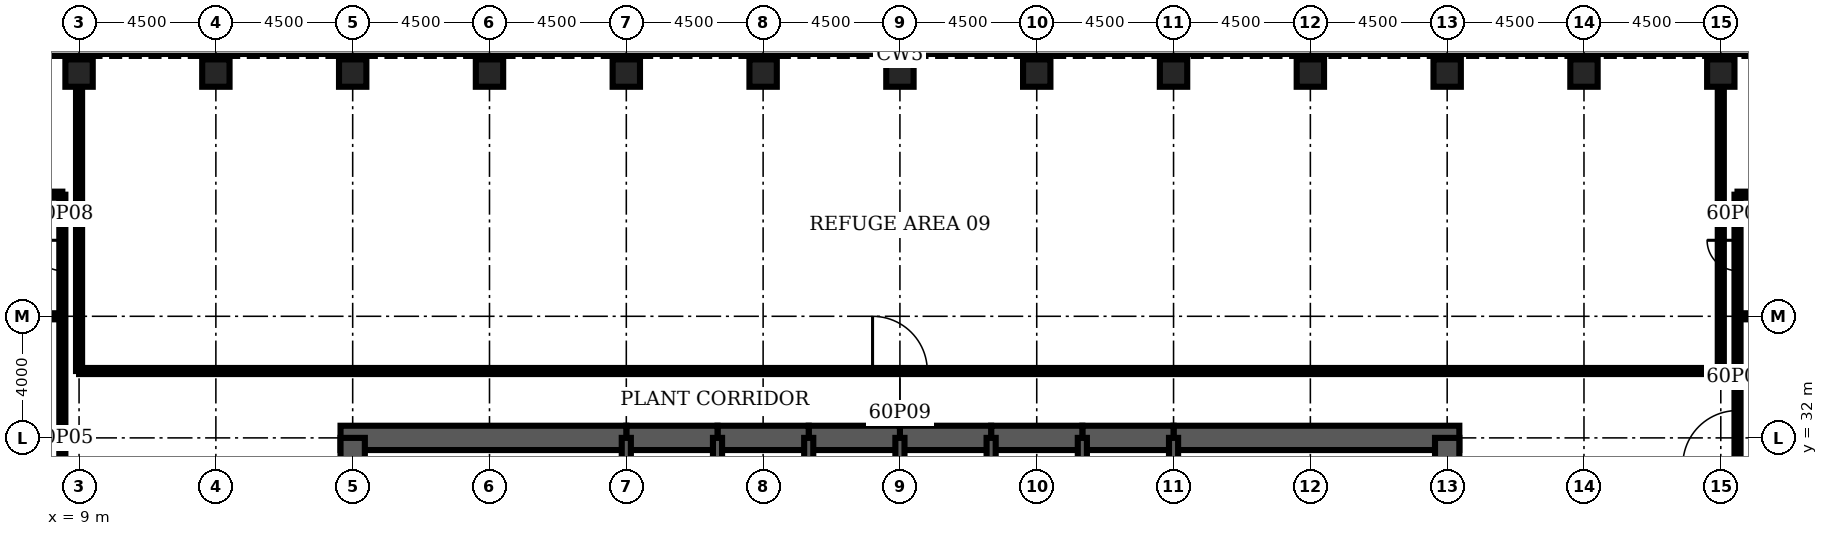
"""IFC4 building model, lengths in metres.
Left out: names, types, materials, properties, quantities, classifications, styles, units other than length and angle.
Written with IfcOpenShell. Run it as: python <this file> out.ifc"""

import sys

from ifc_helpers import new_model, si_unit, direction, frame, frame_2d, origin, origin_2d, place, context, subcontext, project, spatial, rectangle, hollow_rectangle, extrude, element, fill, save


model = new_model("IFC4")
c1 = context("Model", 3, precision=1e-05, world=origin(), true_north=direction((0.0, 1.0)))
c2 = subcontext(c1, "Body", "Model", "MODEL_VIEW")
j1 = project(units=[si_unit("LENGTHUNIT", "METRE"), si_unit("PLANEANGLEUNIT", "RADIAN")], contexts=[c1])
p1 = place(None, origin())
s1 = spatial("IfcSite", under=j1, at=p1, CompositionType="ELEMENT")
p2 = place(p1, origin())
s2 = spatial("IfcBuilding", under=s1, at=p2, CompositionType="ELEMENT")
p3 = place(p2, frame((0.0, 0.0, 265.6)))
s3 = spatial("IfcBuildingStorey", under=s2, at=p3, CompositionType="ELEMENT", Elevation=265.6)
for number, where, z_axis, x_axis in (
    (1, (63.0, 44.0, 0.0), (0.0, 0.0, 1.0), (0.0, 1.0, 0.0)),
    (2, (58.5, 44.0, 0.0), (0.0, 0.0, 1.0), (0.0, 1.0, 0.0)),
    (3, (54.0, 44.0, 0.0), (0.0, 0.0, 1.0), (0.0, 1.0, 0.0)),
    (4, (49.5, 44.0, 0.0), (0.0, 0.0, 1.0), (0.0, 1.0, 0.0)),
    (5, (45.0, 44.0, 0.0), (0.0, 0.0, 1.0), (0.0, 1.0, 0.0)),
    (6, (40.5, 44.0, 0.0), (0.0, 0.0, 1.0), (0.0, 1.0, 0.0)),
    (7, (36.0, 44.0, 0.0), (0.0, 0.0, 1.0), (0.0, 1.0, 0.0)),
    (8, (31.5, 44.0, 0.0), (0.0, 0.0, 1.0), (0.0, 1.0, 0.0)),
    (9, (27.0, 44.0, 0.0), (0.0, 0.0, 1.0), (0.0, 1.0, 0.0)),
    (10, (22.5, 44.0, 0.0), (0.0, 0.0, 1.0), (0.0, 1.0, 0.0)),
    (11, (18.0, 44.0, 0.0), (0.0, 0.0, 1.0), (0.0, 1.0, 0.0)),
    (12, (13.5, 44.0, 0.0), (0.0, 0.0, 1.0), (0.0, 1.0, 0.0)),
    (13, (9.0, 44.0, 0.0), (0.0, 0.0, 1.0), (0.0, 1.0, 0.0)),
):
    element("IfcColumn", number, at=place(p3, frame(where, z_axis=z_axis, x_axis=x_axis)), inside=s3, PredefinedType="COLUMN", context=c2, shape_type="SweptSolid", body=[
        extrude(hollow_rectangle(XDim=0.9, YDim=0.9, WallThickness=0.07, at=origin_2d()), origin(), (0.0, 0.0, 1.0), 5.5),
    ])
p4 = place(p3, frame((54.4, 32.0, 0.0), z_axis=(0.0, 0.0, 1.0), x_axis=(-1.0, 0.0, 0.0)))
e14 = element("IfcWall", 14, at=p4, inside=s3, PredefinedType="SHEAR", context=c2, shape_type="SweptSolid", body=[
    extrude(rectangle(XDim=9.4, YDim=0.8, at=frame_2d((4.7, 0.0))), origin(), (0.0, 0.0, 1.0), 5.5),
])
for number, where, z_axis, x_axis in (
    (15, (45.0, 32.0, 0.0), (0.0, 0.0, 1.0), (-1.0, 0.0, 0.0)),
    (16, (42.0, 32.0, 0.0), (0.0, 0.0, 1.0), (-1.0, 0.0, 0.0)),
    (17, (39.0, 32.0, 0.0), (0.0, 0.0, 1.0), (-1.0, 0.0, 0.0)),
    (18, (36.0, 32.0, 0.0), (0.0, 0.0, 1.0), (-1.0, 0.0, 0.0)),
    (19, (33.0, 32.0, 0.0), (0.0, 0.0, 1.0), (-1.0, 0.0, 0.0)),
    (20, (30.0, 32.0, 0.0), (0.0, 0.0, 1.0), (-1.0, 0.0, 0.0)),
):
    element("IfcWall", number, at=place(p3, frame(where, z_axis=z_axis, x_axis=x_axis)), inside=s3, PredefinedType="SHEAR", context=c2, shape_type="SweptSolid", body=[
        extrude(rectangle(XDim=3.0, YDim=0.8, at=frame_2d((1.5, 0.0))), origin(), (0.0, 0.0, 1.0), 5.5),
    ])
p5 = place(p3, frame((27.0, 32.0, 0.0), z_axis=(0.0, 0.0, 1.0), x_axis=(-1.0, 0.0, 0.0)))
e21 = element("IfcWall", 21, at=p5, inside=s3, PredefinedType="SHEAR", context=c2, shape_type="SweptSolid", body=[
    extrude(rectangle(XDim=9.4, YDim=0.8, at=frame_2d((4.7, 0.0))), origin(), (0.0, 0.0, 1.0), 5.5),
])
for number, where, z_axis, x_axis in (
    (22, (18.0, 32.0, 0.0), (0.0, 0.0, 1.0), (0.0, -1.0, 0.0)),
    (23, (54.0, 28.8, 0.0), (0.0, 0.0, 1.0), (0.0, 1.0, 0.0)),
):
    element("IfcWall", number, at=place(p3, frame(where, z_axis=z_axis, x_axis=x_axis)), inside=s3, PredefinedType="SHEAR", context=c2, shape_type="SweptSolid", body=[
        extrude(rectangle(XDim=3.2, YDim=0.8, at=frame_2d((1.6, 0.0))), origin(), (0.0, 0.0, 1.0), 5.5),
    ])
for number, where, z_axis, x_axis in (
    (24, (27.0, 28.8, 0.0), (0.0, 0.0, 1.0), (0.0, 1.0, 0.0)),
    (25, (30.0, 28.8, 0.0), (0.0, 0.0, 1.0), (0.0, 1.0, 0.0)),
    (26, (33.0, 28.8, 0.0), (0.0, 0.0, 1.0), (0.0, 1.0, 0.0)),
    (27, (36.0, 28.8, 0.0), (0.0, 0.0, 1.0), (0.0, 1.0, 0.0)),
    (28, (39.0, 28.8, 0.0), (0.0, 0.0, 1.0), (0.0, 1.0, 0.0)),
    (29, (42.0, 28.8, 0.0), (0.0, 0.0, 1.0), (0.0, 1.0, 0.0)),
    (30, (45.0, 28.8, 0.0), (0.0, 0.0, 1.0), (0.0, 1.0, 0.0)),
):
    element("IfcWall", number, at=place(p3, frame(where, z_axis=z_axis, x_axis=x_axis)), inside=s3, PredefinedType="SOLIDWALL", context=c2, shape_type="SweptSolid", body=[
        extrude(rectangle(XDim=3.2, YDim=0.3, at=frame_2d((1.6, 0.0))), origin(), (0.0, 0.0, 1.0), 5.5),
    ])
p6 = place(p3, frame((9.0, 34.2, 0.0), z_axis=(0.0, 0.0, 1.0), x_axis=(1.0, 0.0, 0.0)))
e31 = element("IfcWall", 31, at=p6, inside=s3, PredefinedType="PARTITIONING", context=c2, shape_type="SweptSolid", body=[
    extrude(rectangle(XDim=54.0, YDim=0.2, at=frame_2d((27.0, 0.0))), origin(), (0.0, 0.0, 1.0), 5.34),
])
p7 = place(p6, frame((26.1, 0.0, 0.0)))
e32 = element("IfcOpeningElement", 32, at=p7, cuts=e31, PredefinedType="OPENING", context=c2, shape_type="SweptSolid", body=[
    extrude(rectangle(XDim=1.8, YDim=2.1, at=frame_2d((0.9, 1.05))), frame((0.0, 0.11, 0.0), z_axis=(0.0, -1.0, 0.0), x_axis=(1.0, 0.0, 0.0)), (0.0, 0.0, 1.0), 0.22),
])
p8 = place(p3, frame((0.45, 36.0, 0.0), z_axis=(0.0, 0.0, 1.0), x_axis=(1.0, 0.0, 0.0)))
e33 = element("IfcWall", 33, at=p8, inside=s3, PredefinedType="PARTITIONING", context=c2, shape_type="SweptSolid", body=[
    extrude(rectangle(XDim=8.0, YDim=0.2, at=frame_2d((4.0, 0.0))), origin(), (0.0, 0.0, 1.0), 5.34),
])
p9 = place(p3, frame((63.55, 36.0, 0.0), z_axis=(0.0, 0.0, 1.0), x_axis=(1.0, 0.0, 0.0)))
e34 = element("IfcWall", 34, at=p9, inside=s3, PredefinedType="PARTITIONING", context=c2, shape_type="SweptSolid", body=[
    extrude(rectangle(XDim=6.2, YDim=0.2, at=frame_2d((3.1, 0.0))), origin(), (0.0, 0.0, 1.0), 5.25),
])
p10 = place(p3, frame((2.7, 40.0, 0.0), z_axis=(0.0, 0.0, 1.0), x_axis=(1.0, 0.0, 0.0)))
e35 = element("IfcWall", 35, at=p10, inside=s3, PredefinedType="PARTITIONING", context=c2, shape_type="SweptSolid", body=[
    extrude(rectangle(XDim=5.75, YDim=0.2, at=frame_2d((2.875, 0.0))), origin(), (0.0, 0.0, 1.0), 5.34),
])
p11 = place(p3, frame((63.55, 40.0, 0.0), z_axis=(0.0, 0.0, 1.0), x_axis=(1.0, 0.0, 0.0)))
e36 = element("IfcWall", 36, at=p11, inside=s3, PredefinedType="PARTITIONING", context=c2, shape_type="SweptSolid", body=[
    extrude(rectangle(XDim=3.95, YDim=0.2, at=frame_2d((1.975, 0.0))), origin(), (0.0, 0.0, 1.0), 5.34),
])
p12 = place(p3, frame((8.45, 6.0, 0.0), z_axis=(0.0, 0.0, 1.0), x_axis=(0.0, 1.0, 0.0)))
e37 = element("IfcWall", 37, at=p12, inside=s3, PredefinedType="PARTITIONING", context=c2, shape_type="SweptSolid", body=[
    extrude(rectangle(XDim=34.0, YDim=0.2, at=frame_2d((17.0, 0.0))), origin(), (0.0, 0.0, 1.0), 5.34),
])
p13 = place(p12, frame((8.1, 0.0, 0.0)))
e38 = element("IfcOpeningElement", 38, at=p13, cuts=e37, PredefinedType="OPENING", context=c2, shape_type="SweptSolid", body=[
    extrude(rectangle(XDim=1.8, YDim=2.1, at=frame_2d((0.9, 1.05))), frame((0.0, 0.11, 0.0), z_axis=(0.0, -1.0, 0.0), x_axis=(1.0, 0.0, 0.0)), (0.0, 0.0, 1.0), 0.22),
])
p14 = place(p12, frame((23.1, 0.0, 0.0)))
e39 = element("IfcOpeningElement", 39, at=p14, cuts=e37, PredefinedType="OPENING", context=c2, shape_type="SweptSolid", body=[
    extrude(rectangle(XDim=1.8, YDim=2.1, at=frame_2d((0.9, 1.05))), frame((0.0, 0.11, 0.0), z_axis=(0.0, -1.0, 0.0), x_axis=(1.0, 0.0, 0.0)), (0.0, 0.0, 1.0), 0.22),
])
p15 = place(p12, frame((31.5, 0.0, 0.0)))
e40 = element("IfcOpeningElement", 40, at=p15, cuts=e37, PredefinedType="OPENING", context=c2, shape_type="SweptSolid", body=[
    extrude(rectangle(XDim=1.0, YDim=2.1, at=frame_2d((0.5, 1.05))), frame((0.0, 0.11, 0.0), z_axis=(0.0, -1.0, 0.0), x_axis=(1.0, 0.0, 0.0)), (0.0, 0.0, 1.0), 0.22),
])
for number, where, z_axis, x_axis in (
    (41, (9.0, 34.2, 0.0), (0.0, 0.0, 1.0), (0.0, 1.0, 0.0)),
    (42, (63.0, 34.2, 0.0), (0.0, 0.0, 1.0), (0.0, 1.0, 0.0)),
):
    element("IfcWall", number, at=place(p3, frame(where, z_axis=z_axis, x_axis=x_axis)), inside=s3, PredefinedType="PARTITIONING", context=c2, shape_type="SweptSolid", body=[
        extrude(rectangle(XDim=9.35, YDim=0.2, at=frame_2d((4.675, 0.0))), origin(), (0.0, 0.0, 1.0), 5.34),
    ])
p16 = place(p3, frame((63.55, 6.0, 0.0), z_axis=(0.0, 0.0, 1.0), x_axis=(0.0, 1.0, 0.0)))
e43 = element("IfcWall", 43, at=p16, inside=s3, PredefinedType="PARTITIONING", context=c2, shape_type="SweptSolid", body=[
    extrude(rectangle(XDim=34.0, YDim=0.2, at=frame_2d((17.0, 0.0))), origin(), (0.0, 0.0, 1.0), 5.34),
])
p17 = place(p16, frame((8.1, 0.0, 0.0)))
e44 = element("IfcOpeningElement", 44, at=p17, cuts=e43, PredefinedType="OPENING", context=c2, shape_type="SweptSolid", body=[
    extrude(rectangle(XDim=1.8, YDim=2.1, at=frame_2d((0.9, 1.05))), frame((0.0, 0.11, 0.0), z_axis=(0.0, -1.0, 0.0), x_axis=(1.0, 0.0, 0.0)), (0.0, 0.0, 1.0), 0.22),
])
p18 = place(p16, frame((19.5, 0.0, 0.0)))
e45 = element("IfcOpeningElement", 45, at=p18, cuts=e43, PredefinedType="OPENING", context=c2, shape_type="SweptSolid", body=[
    extrude(rectangle(XDim=1.0, YDim=2.1, at=frame_2d((0.5, 1.05))), frame((0.0, 0.11, 0.0), z_axis=(0.0, -1.0, 0.0), x_axis=(1.0, 0.0, 0.0)), (0.0, 0.0, 1.0), 0.22),
])
p19 = place(p16, frame((25.1, 0.0, 0.0)))
e46 = element("IfcOpeningElement", 46, at=p19, cuts=e43, PredefinedType="OPENING", context=c2, shape_type="SweptSolid", body=[
    extrude(rectangle(XDim=1.8, YDim=2.1, at=frame_2d((0.9, 1.05))), frame((0.0, 0.11, 0.0), z_axis=(0.0, -1.0, 0.0), x_axis=(1.0, 0.0, 0.0)), (0.0, 0.0, 1.0), 0.22),
])
p20 = place(p16, frame((31.5, 0.0, 0.0)))
e47 = element("IfcOpeningElement", 47, at=p20, cuts=e43, PredefinedType="OPENING", context=c2, shape_type="SweptSolid", body=[
    extrude(rectangle(XDim=1.0, YDim=2.1, at=frame_2d((0.5, 1.05))), frame((0.0, 0.11, 0.0), z_axis=(0.0, -1.0, 0.0), x_axis=(1.0, 0.0, 0.0)), (0.0, 0.0, 1.0), 0.22),
])
p21 = place(p19, origin())
e48 = element("IfcDoor", 48, at=p21, inside=s3, OperationType="SINGLE_SWING_LEFT", PredefinedType="DOOR", context=c2, shape_type="SweptSolid", body=[
    extrude(rectangle(XDim=1.8, YDim=2.1, at=frame_2d((0.9, 1.05))), frame((0.0, 0.025, 0.0), z_axis=(0.0, -1.0, 0.0), x_axis=(1.0, 0.0, 0.0)), (0.0, 0.0, 1.0), 0.05),
])
fill(e46, e48)
p22 = place(p20, origin())
e49 = element("IfcDoor", 49, at=p22, inside=s3, OperationType="SINGLE_SWING_RIGHT", PredefinedType="DOOR", context=c2, shape_type="SweptSolid", body=[
    extrude(rectangle(XDim=1.0, YDim=2.1, at=frame_2d((0.5, 1.05))), frame((0.0, 0.025, 0.0), z_axis=(0.0, -1.0, 0.0), x_axis=(1.0, 0.0, 0.0)), (0.0, 0.0, 1.0), 0.05),
])
fill(e47, e49)
p23 = place(p15, origin())
e50 = element("IfcDoor", 50, at=p23, inside=s3, OperationType="SINGLE_SWING_RIGHT", PredefinedType="DOOR", context=c2, shape_type="SweptSolid", body=[
    extrude(rectangle(XDim=1.0, YDim=2.1, at=frame_2d((0.5, 1.05))), frame((0.0, 0.025, 0.0), z_axis=(0.0, -1.0, 0.0), x_axis=(1.0, 0.0, 0.0)), (0.0, 0.0, 1.0), 0.05),
])
fill(e40, e50)
p24 = place(p7, origin())
e51 = element("IfcDoor", 51, at=p24, inside=s3, OperationType="SINGLE_SWING_LEFT", PredefinedType="DOOR", context=c2, shape_type="SweptSolid", body=[
    extrude(rectangle(XDim=1.8, YDim=2.1, at=frame_2d((0.9, 1.05))), frame((0.0, 0.025, 0.0), z_axis=(0.0, -1.0, 0.0), x_axis=(1.0, 0.0, 0.0)), (0.0, 0.0, 1.0), 0.05),
])
fill(e32, e51)
save(model, sys.argv[1])
